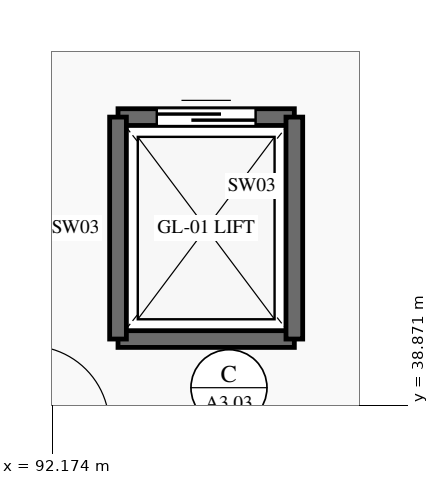
"""IFC4 building model, lengths in metres.
Left out: names, types, materials, properties, quantities, classifications, styles, units other than length and angle.
Written with IfcOpenShell. Run it as: python <this file> out.ifc"""

import sys

from ifc_helpers import new_model, si_unit, direction, frame, frame_2d, origin, place, context, subcontext, project, spatial, rectangle, extrude, element, fill, save


model = new_model("IFC4")
c1 = context("Model", 3, precision=1e-05, world=origin(), true_north=direction((0.0, 1.0)))
c2 = subcontext(c1, "Body", "Model", "MODEL_VIEW")
j1 = project(units=[si_unit("LENGTHUNIT", "METRE"), si_unit("PLANEANGLEUNIT", "RADIAN")], contexts=[c1])
p1 = place(None, origin())
s1 = spatial("IfcSite", under=j1, at=p1, CompositionType="ELEMENT")
p2 = place(p1, origin())
s2 = spatial("IfcBuilding", under=s1, at=p2, CompositionType="ELEMENT")
p3 = place(p2, origin())
s3 = spatial("IfcBuildingStorey", under=s2, at=p3, CompositionType="ELEMENT", Elevation=0.0)
p4 = place(p3, frame((93.04, 39.74, 0.0), z_axis=(0.0, 0.0, 1.0), x_axis=(1.0, 0.0, 0.0)))
e1 = element("IfcWall", 1, at=p4, inside=s3, PredefinedType="SHEAR", context=c2, shape_type="SweptSolid", body=[
    extrude(rectangle(XDim=2.32, YDim=0.22, at=frame_2d((1.16, 0.0))), origin(), (0.0, 0.0, 1.0), 6.0),
])
p5 = place(p3, frame((93.04, 42.66, 0.0), z_axis=(0.0, 0.0, 1.0), x_axis=(1.0, 0.0, 0.0)))
e2 = element("IfcWall", 2, at=p5, inside=s3, PredefinedType="SHEAR", context=c2, shape_type="SweptSolid", body=[
    extrude(rectangle(XDim=2.32, YDim=0.22, at=frame_2d((1.16, 0.0))), origin(), (0.0, 0.0, 1.0), 6.0),
])
p6 = place(p5, frame((0.51, 0.0, 0.0)))
e3 = element("IfcOpeningElement", 3, at=p6, cuts=e2, PredefinedType="OPENING", context=c2, shape_type="SweptSolid", body=[
    extrude(rectangle(XDim=1.3, YDim=2.25, at=frame_2d((0.65, 1.125))), frame((0.0, 0.125, 0.0), z_axis=(0.0, -1.0, 0.0), x_axis=(1.0, 0.0, 0.0)), (0.0, 0.0, 1.0), 0.25),
])
for number, where, z_axis, x_axis in (
    (4, (93.04, 39.74, 0.0), (0.0, 0.0, 1.0), (0.0, 1.0, 0.0)),
    (5, (95.36, 39.74, 0.0), (0.0, 0.0, 1.0), (0.0, 1.0, 0.0)),
):
    element("IfcWall", number, at=place(p3, frame(where, z_axis=z_axis, x_axis=x_axis)), inside=s3, PredefinedType="SHEAR", context=c2, shape_type="SweptSolid", body=[
        extrude(rectangle(XDim=2.92, YDim=0.22, at=frame_2d((1.46, 0.0))), origin(), (0.0, 0.0, 1.0), 6.0),
    ])
p7 = place(p6, origin())
e6 = element("IfcDoor", 6, at=p7, inside=s3, OperationType="SLIDING_TO_LEFT", PredefinedType="DOOR", context=c2, shape_type="SweptSolid", body=[
    extrude(rectangle(XDim=1.3, YDim=2.25, at=frame_2d((0.65, 1.125))), frame((0.0, 0.025, 0.0), z_axis=(0.0, -1.0, 0.0), x_axis=(1.0, 0.0, 0.0)), (0.0, 0.0, 1.0), 0.05),
])
fill(e3, e6)
save(model, sys.argv[1])
